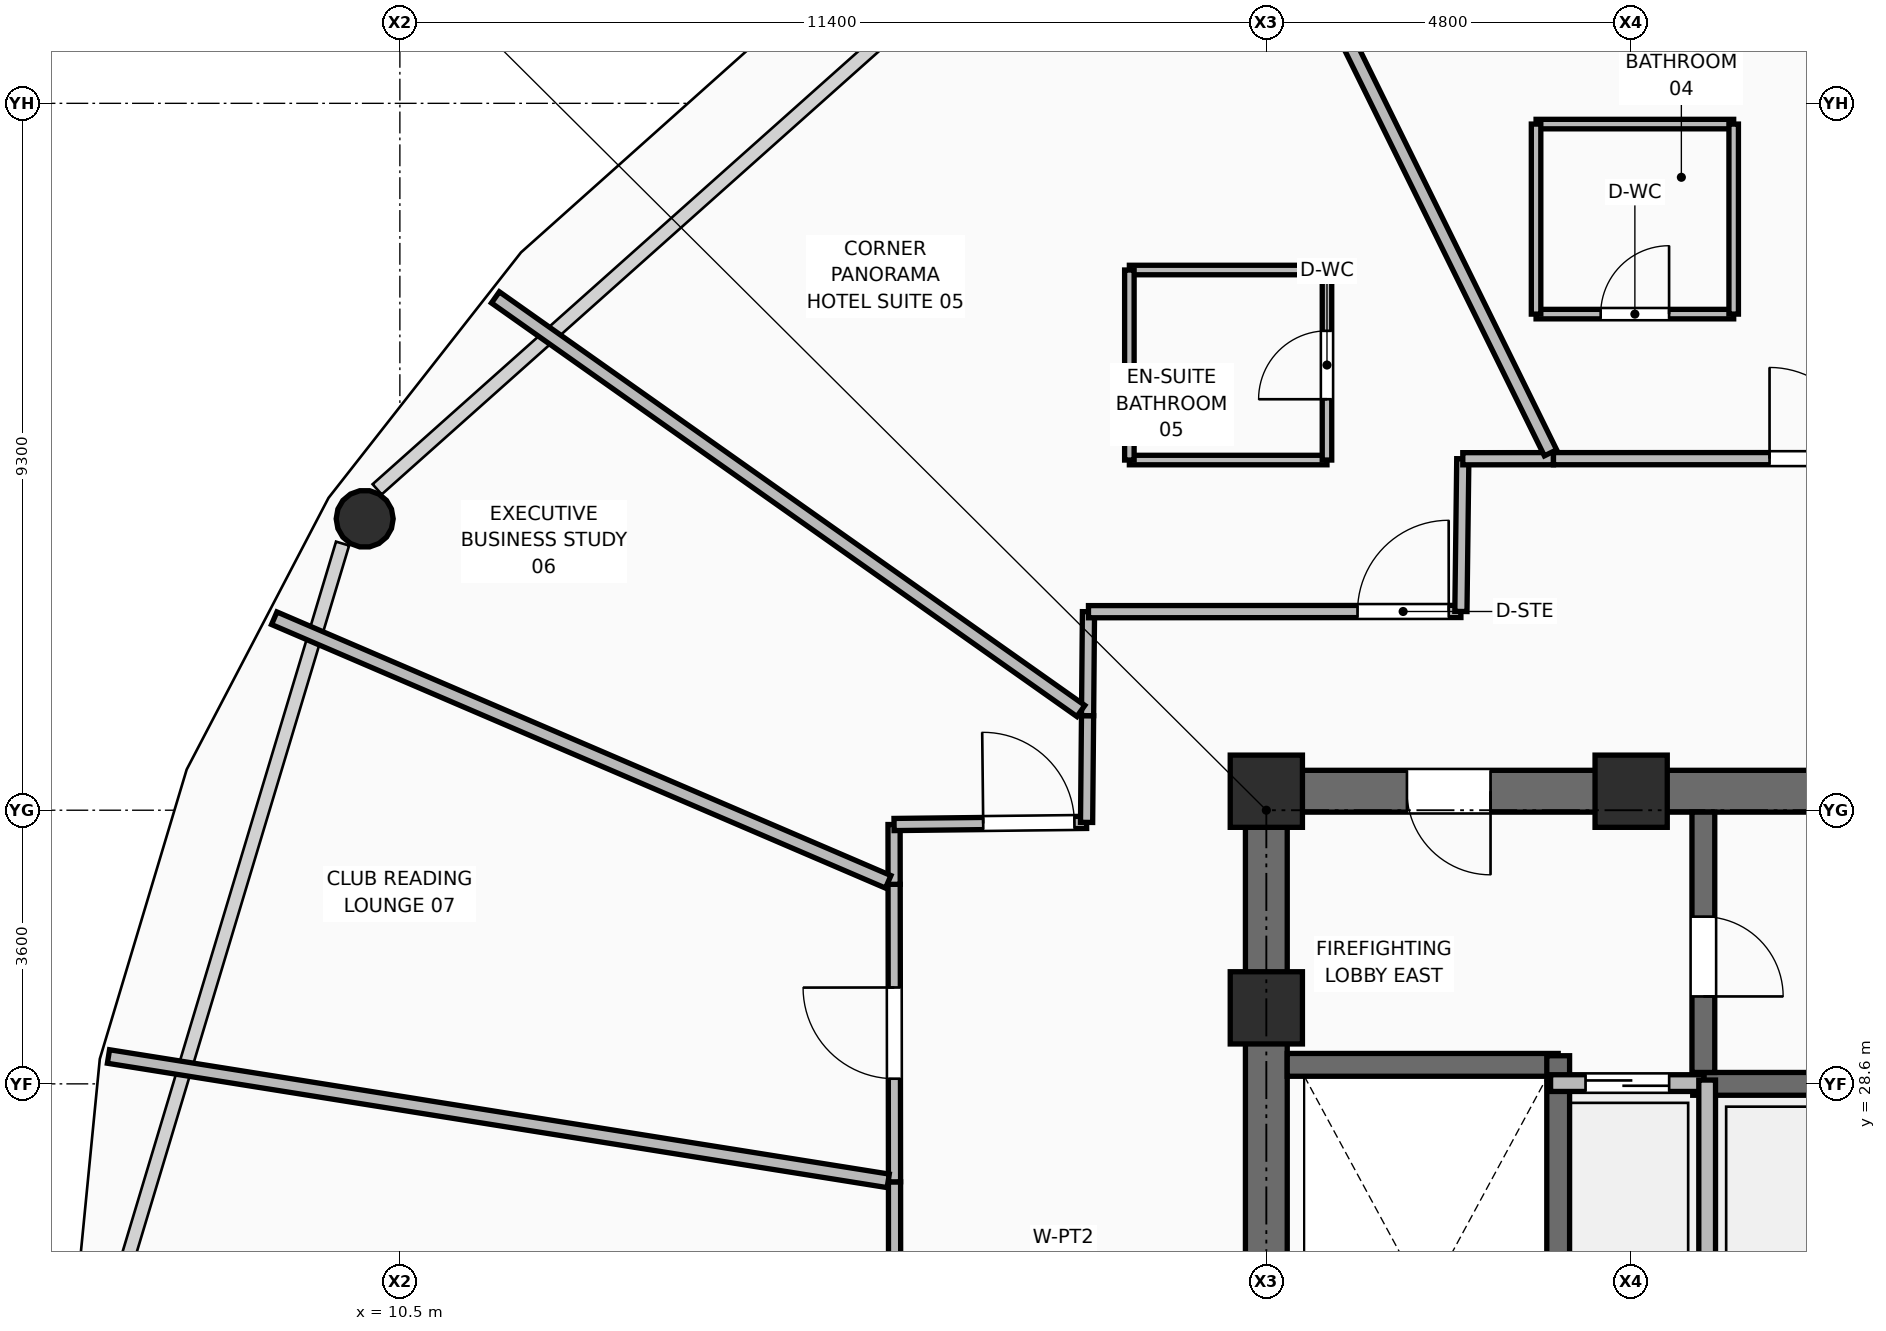
"""IFC4 building model, lengths in metres.
Left out: names, types, materials, properties, quantities, classifications, styles, units other than length and angle.
Written with IfcOpenShell. Run it as: python <this file> out.ifc"""

import sys

from ifc_helpers import new_model, si_unit, direction, frame, frame_2d, origin, origin_2d, place, context, subcontext, project, spatial, rectangle, hollow_circle, extrude, element, fill, save


model = new_model("IFC4")
c1 = context("Model", 3, precision=1e-05, world=origin(), true_north=direction((0.0, 1.0)))
c2 = subcontext(c1, "Body", "Model", "MODEL_VIEW")
j1 = project(units=[si_unit("LENGTHUNIT", "METRE"), si_unit("PLANEANGLEUNIT", "RADIAN")], contexts=[c1])
p1 = place(None, origin())
s1 = spatial("IfcSite", under=j1, at=p1, CompositionType="ELEMENT")
p2 = place(p1, origin())
s2 = spatial("IfcBuilding", under=s1, at=p2, CompositionType="ELEMENT")
p3 = place(p2, frame((0.0, 0.0, 149.7)))
s3 = spatial("IfcBuildingStorey", under=s2, at=p3, CompositionType="ELEMENT", Elevation=149.7)
for number, where, z_axis, x_axis in (
    (1, (21.9, 29.6, 0.0), (0.0, 0.0, 1.0), (1.0, 0.0, 0.0)),
    (2, (21.9, 32.45, 0.0), (0.0, 0.0, 1.0), (1.0, 0.0, 0.0)),
    (3, (26.7, 32.45, 0.0), (0.0, 0.0, 1.0), (1.0, 0.0, 0.0)),
):
    element("IfcColumn", number, at=place(p3, frame(where, z_axis=z_axis, x_axis=x_axis)), inside=s3, PredefinedType="COLUMN", context=c2, shape_type="SweptSolid", body=[
        extrude(rectangle(XDim=0.95, YDim=0.95, at=origin_2d()), origin(), (0.0, 0.0, 1.0), 3.75),
    ])
p4 = place(p3, frame((10.037, 36.034, 0.0), z_axis=(0.0, 0.0, 1.0), x_axis=(1.0, 0.0, 0.0)))
e4 = element("IfcColumn", 4, at=p4, inside=s3, PredefinedType="COLUMN", context=c2, shape_type="SweptSolid", body=[
    extrude(hollow_circle(Radius=0.375, WallThickness=0.035, at=origin_2d()), origin(), (0.0, 0.0, 1.0), 3.57),
])
p5 = place(p3, frame((21.625, 32.45, 0.0), z_axis=(0.0, 0.0, 1.0), x_axis=(1.0, 0.0, 0.0)))
e5 = element("IfcWall", 5, at=p5, inside=s3, PredefinedType="SHEAR", context=c2, shape_type="SweptSolid", body=[
    extrude(rectangle(XDim=19.75, YDim=0.55, at=frame_2d((9.875, 0.0))), origin(), (0.0, 0.0, 1.0), 3.57),
])
p6 = place(p5, frame((2.125, 0.0, 0.0)))
e6 = element("IfcOpeningElement", 6, at=p6, cuts=e5, PredefinedType="OPENING", context=c2, shape_type="SweptSolid", body=[
    extrude(rectangle(XDim=1.1, YDim=2.1, at=frame_2d((0.55, 1.05))), frame((0.0, 0.285, 0.0), z_axis=(0.0, -1.0, 0.0), x_axis=(1.0, 0.0, 0.0)), (0.0, 0.0, 1.0), 0.57),
])
p7 = place(p5, frame((15.515, 0.0, 0.0)))
e7 = element("IfcOpeningElement", 7, at=p7, cuts=e5, PredefinedType="OPENING", context=c2, shape_type="SweptSolid", body=[
    extrude(rectangle(XDim=1.0, YDim=2.1, at=frame_2d((0.5, 1.05))), frame((0.0, 0.285, 0.0), z_axis=(0.0, -1.0, 0.0), x_axis=(1.0, 0.0, 0.0)), (0.0, 0.0, 1.0), 0.57),
])
p8 = place(p5, frame((17.525, 0.0, 0.0)))
e8 = element("IfcOpeningElement", 8, at=p8, cuts=e5, PredefinedType="OPENING", context=c2, shape_type="SweptSolid", body=[
    extrude(rectangle(XDim=0.9, YDim=2.1, at=frame_2d((0.45, 1.05))), frame((0.0, 0.285, 0.0), z_axis=(0.0, -1.0, 0.0), x_axis=(1.0, 0.0, 0.0)), (0.0, 0.0, 1.0), 0.57),
])
p9 = place(p3, frame((21.9, 18.075, 0.0), z_axis=(0.0, 0.0, 1.0), x_axis=(0.0, 1.0, 0.0)))
e9 = element("IfcWall", 9, at=p9, inside=s3, PredefinedType="SHEAR", context=c2, shape_type="SweptSolid", body=[
    extrude(rectangle(XDim=14.1, YDim=0.55, at=frame_2d((7.05, 0.0))), origin(), (0.0, 0.0, 1.0), 3.57),
])
p10 = place(p3, frame((22.175, 28.85, 0.0), z_axis=(0.0, 0.0, 1.0), x_axis=(1.0, 0.0, 0.0)))
e10 = element("IfcWall", 10, at=p10, inside=s3, PredefinedType="SHEAR", context=c2, shape_type="SweptSolid", body=[
    extrude(rectangle(XDim=3.565, YDim=0.3, at=frame_2d((1.782, 0.0))), origin(), (0.0, 0.0, 1.0), 3.57),
])
p11 = place(p3, frame((25.74, 20.98, 0.0), z_axis=(0.0, 0.0, 1.0), x_axis=(0.0, 1.0, 0.0)))
e11 = element("IfcWall", 11, at=p11, inside=s3, PredefinedType="SHEAR", context=c2, shape_type="SweptSolid", body=[
    extrude(rectangle(XDim=7.99, YDim=0.3, at=frame_2d((3.995, 0.0))), origin(), (0.0, 0.0, 1.0), 3.57),
])
p12 = place(p3, frame((27.51, 28.6, 0.0), z_axis=(0.0, 0.0, 1.0), x_axis=(1.0, 0.0, 0.0)))
e12 = element("IfcWall", 12, at=p12, inside=s3, PredefinedType="SHEAR", context=c2, shape_type="SweptSolid", body=[
    extrude(rectangle(XDim=8.03, YDim=0.3, at=frame_2d((4.015, 0.0))), origin(), (0.0, 0.0, 1.0), 3.57),
])
p13 = place(p3, frame((27.65, 28.75, 0.0), z_axis=(0.0, 0.0, 1.0), x_axis=(0.0, 1.0, 0.0)))
e13 = element("IfcWall", 13, at=p13, inside=s3, PredefinedType="SHEAR", context=c2, shape_type="SweptSolid", body=[
    extrude(rectangle(XDim=3.425, YDim=0.3, at=frame_2d((1.712, 0.0))), origin(), (0.0, 0.0, 1.0), 3.57),
])
p14 = place(p13, frame((1.0, 0.0, 0.0)))
e14 = element("IfcOpeningElement", 14, at=p14, cuts=e13, PredefinedType="OPENING", context=c2, shape_type="SweptSolid", body=[
    extrude(rectangle(XDim=1.05, YDim=2.1, at=frame_2d((0.525, 1.05))), frame((0.0, 0.16, 0.0), z_axis=(0.0, -1.0, 0.0), x_axis=(1.0, 0.0, 0.0)), (0.0, 0.0, 1.0), 0.32),
])
p15 = place(p3, frame((25.64, 28.61, 0.0), z_axis=(0.0, 0.0, 1.0), x_axis=(1.0, 0.0, 0.0)))
e15 = element("IfcWall", 15, at=p15, inside=s3, PredefinedType="PARTITIONING", context=c2, shape_type="SweptSolid", body=[
    extrude(rectangle(XDim=2.02, YDim=0.22, at=frame_2d((1.01, 0.0))), origin(), (0.0, 0.0, 1.0), 3.55),
])
p16 = place(p15, frame((0.46, 0.0, 0.0)))
e16 = element("IfcOpeningElement", 16, at=p16, cuts=e15, PredefinedType="OPENING", context=c2, shape_type="SweptSolid", body=[
    extrude(rectangle(XDim=1.1, YDim=2.2, at=frame_2d((0.55, 1.1))), frame((0.0, 0.12, 0.0), z_axis=(0.0, -1.0, 0.0), x_axis=(1.0, 0.0, 0.0)), (0.0, 0.0, 1.0), 0.24),
])
p17 = place(p3, frame((27.7, 25.65, 0.0), z_axis=(0.0, 0.0, 1.0), x_axis=(0.0, 1.0, 0.0)))
e17 = element("IfcWall", 17, at=p17, inside=s3, PredefinedType="PARTITIONING", context=c2, shape_type="SweptSolid", body=[
    extrude(rectangle(XDim=3.0, YDim=0.22, at=frame_2d((1.5, 0.0))), origin(), (0.0, 0.0, 1.0), 3.55),
])
p18 = place(p3, frame((17.009, 26.125, 0.0), z_axis=(0.0, 0.0, 1.0), x_axis=(-0.00082338383, 0.999999661019, 0.0)))
e18 = element("IfcWall", 18, at=p18, inside=s3, PredefinedType="PARTITIONING", context=c2, shape_type="SweptSolid", body=[
    extrude(rectangle(XDim=1.186, YDim=0.16, at=frame_2d((0.593, 0.0))), origin(), (0.0, 0.0, 1.0), 3.55),
])
p19 = place(p3, frame((17.008, 27.311, 0.0), z_axis=(0.0, 0.0, 1.0), x_axis=(-0.001309879116, 0.999999142108, 0.0)))
e19 = element("IfcWall", 19, at=p19, inside=s3, PredefinedType="PARTITIONING", context=c2, shape_type="SweptSolid", body=[
    extrude(rectangle(XDim=3.914, YDim=0.16, at=frame_2d((1.957, 0.0))), origin(), (0.0, 0.0, 1.0), 3.55),
])
p20 = place(p19, frame((1.357, 0.0, 0.0)))
e20 = element("IfcOpeningElement", 20, at=p20, cuts=e19, PredefinedType="OPENING", context=c2, shape_type="SweptSolid", body=[
    extrude(rectangle(XDim=1.2, YDim=2.1, at=frame_2d((0.6, 1.05))), frame((0.0, 0.09, 0.0), z_axis=(0.0, -1.0, 0.0), x_axis=(1.0, 0.0, 0.0)), (0.0, 0.0, 1.0), 0.18),
])
p21 = place(p3, frame((17.003, 31.225, 0.0), z_axis=(0.0, 0.0, 1.0), x_axis=(-0.001241078784, 0.999999229861, 0.0)))
e21 = element("IfcWall", 21, at=p21, inside=s3, PredefinedType="PARTITIONING", context=c2, shape_type="SweptSolid", body=[
    extrude(rectangle(XDim=0.787, YDim=0.16, at=frame_2d((0.394, 0.0))), origin(), (0.0, 0.0, 1.0), 3.55),
])
p22 = place(p3, frame((17.002, 32.012, 0.0), z_axis=(0.0, 0.0, 1.0), x_axis=(0.999938574393, 0.011083656487, 0.0)))
e22 = element("IfcWall", 22, at=p22, inside=s3, PredefinedType="PARTITIONING", context=c2, shape_type="SweptSolid", body=[
    extrude(rectangle(XDim=2.533, YDim=0.16, at=frame_2d((1.267, 0.0))), origin(), (0.0, 0.0, 1.0), 3.55),
])
p23 = place(p22, frame((1.173, 0.0, 0.0)))
e23 = element("IfcOpeningElement", 23, at=p23, cuts=e22, PredefinedType="OPENING", context=c2, shape_type="SweptSolid", body=[
    extrude(rectangle(XDim=1.2, YDim=2.1, at=frame_2d((0.6, 1.05))), frame((0.0, 0.09, 0.0), z_axis=(0.0, -1.0, 0.0), x_axis=(1.0, 0.0, 0.0)), (0.0, 0.0, 1.0), 0.18),
])
p24 = place(p3, frame((19.535, 32.04, 0.0), z_axis=(0.0, 0.0, 1.0), x_axis=(0.009389257464, 0.999955919951, 0.0)))
e24 = element("IfcWall", 24, at=p24, inside=s3, PredefinedType="PARTITIONING", context=c2, shape_type="SweptSolid", body=[
    extrude(rectangle(XDim=1.404, YDim=0.16, at=frame_2d((0.702, 0.0))), origin(), (0.0, 0.0, 1.0), 3.006),
])
p25 = place(p3, frame((19.548, 33.444, 0.0), z_axis=(0.0, 0.0, 1.0), x_axis=(0.008744980606, 0.999961761926, 0.0)))
e25 = element("IfcWall", 25, at=p25, inside=s3, PredefinedType="PARTITIONING", context=c2, shape_type="SweptSolid", body=[
    extrude(rectangle(XDim=1.368, YDim=0.16, at=frame_2d((0.684, 0.0))), origin(), (0.0, 0.0, 1.0), 3.55),
])
p26 = place(p3, frame((19.56, 34.812, 0.0), z_axis=(0.0, 0.0, 1.0), x_axis=(0.999999821253, 0.000597907217, 0.0)))
e26 = element("IfcWall", 26, at=p26, inside=s3, PredefinedType="PARTITIONING", context=c2, shape_type="SweptSolid", body=[
    extrude(rectangle(XDim=4.9, YDim=0.16, at=frame_2d((2.45, 0.0))), origin(), (0.0, 0.0, 1.0), 3.006),
])
p27 = place(p26, frame((3.54, 0.0, 0.0)))
e27 = element("IfcOpeningElement", 27, at=p27, cuts=e26, PredefinedType="OPENING", context=c2, shape_type="SweptSolid", body=[
    extrude(rectangle(XDim=1.2, YDim=2.1, at=frame_2d((0.6, 1.05))), frame((0.0, 0.09, 0.0), z_axis=(0.0, -1.0, 0.0), x_axis=(1.0, 0.0, 0.0)), (0.0, 0.0, 1.0), 0.18),
])
p28 = place(p3, frame((24.46, 34.815, 0.0), z_axis=(0.0, 0.0, 1.0), x_axis=(0.01251572883, 0.999921675199, 0.0)))
e28 = element("IfcWall", 28, at=p28, inside=s3, PredefinedType="PARTITIONING", context=c2, shape_type="SweptSolid", body=[
    extrude(rectangle(XDim=2.009, YDim=0.16, at=frame_2d((1.005, 0.0))), origin(), (0.0, 0.0, 1.0), 3.55),
])
p29 = place(p3, frame((24.485, 36.824, 0.0), z_axis=(0.0, 0.0, 1.0), x_axis=(0.999999664894, 0.000818665301, 0.0)))
e29 = element("IfcWall", 29, at=p29, inside=s3, PredefinedType="PARTITIONING", context=c2, shape_type="SweptSolid", body=[
    extrude(rectangle(XDim=1.193, YDim=0.16, at=frame_2d((0.596, 0.0))), origin(), (0.0, 0.0, 1.0), 3.55),
])
p30 = place(p3, frame((25.678, 36.825, 0.0), z_axis=(0.0, 0.0, 1.0), x_axis=(0.999999989491, 0.000144974809, 0.0)))
e30 = element("IfcWall", 30, at=p30, inside=s3, PredefinedType="PARTITIONING", context=c2, shape_type="SweptSolid", body=[
    extrude(rectangle(XDim=6.736, YDim=0.16, at=frame_2d((3.368, 0.0))), origin(), (0.0, 0.0, 1.0), 3.006),
])
p31 = place(p30, frame((2.843, 0.0, 0.0)))
e31 = element("IfcOpeningElement", 31, at=p31, cuts=e30, PredefinedType="OPENING", context=c2, shape_type="SweptSolid", body=[
    extrude(rectangle(XDim=1.2, YDim=2.1, at=frame_2d((0.6, 1.05))), frame((0.0, 0.09, 0.0), z_axis=(0.0, -1.0, 0.0), x_axis=(1.0, 0.0, 0.0)), (0.0, 0.0, 1.0), 0.18),
])
p32 = place(p3, frame((25.639, 36.902, 0.0), z_axis=(0.0, 0.0, 1.0), x_axis=(-0.44167900267, 0.897173148617, 0.0)))
e32 = element("IfcWall", 32, at=p32, inside=s3, PredefinedType="PARTITIONING", context=c2, shape_type="SweptSolid", body=[
    extrude(rectangle(XDim=9.631, YDim=0.18, at=frame_2d((4.815, 0.0))), origin(), (0.0, 0.0, 1.0), 2.852),
])
p33 = place(p3, frame((19.46, 33.506, 0.0), z_axis=(0.0, 0.0, 1.0), x_axis=(-0.816788462003, 0.576937265513, 0.0)))
e33 = element("IfcWall", 33, at=p33, inside=s3, PredefinedType="PARTITIONING", context=c2, shape_type="SweptSolid", body=[
    extrude(rectangle(XDim=9.431, YDim=0.18, at=frame_2d((4.715, 0.0))), origin(), (0.0, 0.0, 1.0), 2.852),
])
p34 = place(p3, frame((16.925, 31.258, 0.0), z_axis=(0.0, 0.0, 1.0), x_axis=(-0.918899218309, 0.394492365694, 0.0)))
e34 = element("IfcWall", 34, at=p34, inside=s3, PredefinedType="PARTITIONING", context=c2, shape_type="SweptSolid", body=[
    extrude(rectangle(XDim=8.791, YDim=0.18, at=frame_2d((4.396, 0.0))), origin(), (0.0, 0.0, 1.0), 2.852),
])
p35 = place(p3, frame((16.925, 27.324, 0.0), z_axis=(0.0, 0.0, 1.0), x_axis=(-0.987522476436, 0.157478120811, 0.0)))
e35 = element("IfcWall", 35, at=p35, inside=s3, PredefinedType="PARTITIONING", context=c2, shape_type="SweptSolid", body=[
    extrude(rectangle(XDim=10.389, YDim=0.18, at=frame_2d((5.194, 0.0))), origin(), (0.0, 0.0, 1.0), 2.852),
])
p36 = place(p3, frame((25.449, 38.727, 0.0), z_axis=(0.0, 0.0, 1.0), x_axis=(1.0, 0.0, 0.0)))
e36 = element("IfcWall", 36, at=p36, inside=s3, PredefinedType="PARTITIONING", context=c2, shape_type="SweptSolid", body=[
    extrude(rectangle(XDim=2.6, YDim=0.125, at=frame_2d((1.3, 0.0))), origin(), (0.0, 0.0, 1.0), 3.55),
])
p37 = place(p36, frame((0.85, 0.0, 0.0)))
e37 = element("IfcOpeningElement", 37, at=p37, cuts=e36, PredefinedType="OPENING", context=c2, shape_type="SweptSolid", body=[
    extrude(rectangle(XDim=0.9, YDim=2.1, at=frame_2d((0.45, 1.05))), frame((0.0, 0.073, 0.0), z_axis=(0.0, -1.0, 0.0), x_axis=(1.0, 0.0, 0.0)), (0.0, 0.0, 1.0), 0.145),
])
p38 = place(p3, frame((25.449, 41.227, 0.0), z_axis=(0.0, 0.0, 1.0), x_axis=(1.0, 0.0, 0.0)))
e38 = element("IfcWall", 38, at=p38, inside=s3, PredefinedType="PARTITIONING", context=c2, shape_type="SweptSolid", body=[
    extrude(rectangle(XDim=2.6, YDim=0.125, at=frame_2d((1.3, 0.0))), origin(), (0.0, 0.0, 1.0), 3.55),
])
for number, where, z_axis, x_axis in (
    (39, (25.449, 38.727, 0.0), (0.0, 0.0, 1.0), (0.0, 1.0, 0.0)),
    (40, (28.049, 38.727, 0.0), (0.0, 0.0, 1.0), (0.0, 1.0, 0.0)),
):
    element("IfcWall", number, at=place(p3, frame(where, z_axis=z_axis, x_axis=x_axis)), inside=s3, PredefinedType="PARTITIONING", context=c2, shape_type="SweptSolid", body=[
        extrude(rectangle(XDim=2.5, YDim=0.125, at=frame_2d((1.25, 0.0))), origin(), (0.0, 0.0, 1.0), 3.55),
    ])
for number, where, z_axis, x_axis in (
    (41, (20.098, 36.807, 0.0), (0.0, 0.0, 1.0), (1.0, 0.0, 0.0)),
    (42, (20.098, 39.307, 0.0), (0.0, 0.0, 1.0), (1.0, 0.0, 0.0)),
):
    element("IfcWall", number, at=place(p3, frame(where, z_axis=z_axis, x_axis=x_axis)), inside=s3, PredefinedType="PARTITIONING", context=c2, shape_type="SweptSolid", body=[
        extrude(rectangle(XDim=2.6, YDim=0.125, at=frame_2d((1.3, 0.0))), origin(), (0.0, 0.0, 1.0), 3.006),
    ])
p39 = place(p3, frame((20.098, 36.807, 0.0), z_axis=(0.0, 0.0, 1.0), x_axis=(0.0, 1.0, 0.0)))
e43 = element("IfcWall", 43, at=p39, inside=s3, PredefinedType="PARTITIONING", context=c2, shape_type="SweptSolid", body=[
    extrude(rectangle(XDim=2.5, YDim=0.125, at=frame_2d((1.25, 0.0))), origin(), (0.0, 0.0, 1.0), 3.006),
])
p40 = place(p3, frame((22.698, 36.807, 0.0), z_axis=(0.0, 0.0, 1.0), x_axis=(0.0, 1.0, 0.0)))
e44 = element("IfcWall", 44, at=p40, inside=s3, PredefinedType="PARTITIONING", context=c2, shape_type="SweptSolid", body=[
    extrude(rectangle(XDim=2.5, YDim=0.125, at=frame_2d((1.25, 0.0))), origin(), (0.0, 0.0, 1.0), 3.55),
])
p41 = place(p40, frame((0.8, 0.0, 0.0)))
e45 = element("IfcOpeningElement", 45, at=p41, cuts=e44, PredefinedType="OPENING", context=c2, shape_type="SweptSolid", body=[
    extrude(rectangle(XDim=0.9, YDim=2.1, at=frame_2d((0.45, 1.05))), frame((0.0, 0.073, 0.0), z_axis=(0.0, -1.0, 0.0), x_axis=(1.0, 0.0, 0.0)), (0.0, 0.0, 1.0), 0.145),
])
p42 = place(p14, frame((1.05, 0.0, 0.0), z_axis=(0.0, 0.0, 1.0), x_axis=(-1.0, 0.0, 0.0)))
e46 = element("IfcDoor", 46, at=p42, inside=s3, OperationType="SINGLE_SWING_RIGHT", PredefinedType="DOOR", context=c2, shape_type="SweptSolid", body=[
    extrude(rectangle(XDim=1.05, YDim=2.1, at=frame_2d((0.525, 1.05))), frame((0.0, 0.025, 0.0), z_axis=(0.0, -1.0, 0.0), x_axis=(1.0, 0.0, 0.0)), (0.0, 0.0, 1.0), 0.05),
])
fill(e14, e46)
p43 = place(p16, origin())
e47 = element("IfcDoor", 47, at=p43, inside=s3, OperationType="DOUBLE_DOOR_SLIDING", PredefinedType="DOOR", context=c2, shape_type="SweptSolid", body=[
    extrude(rectangle(XDim=1.1, YDim=2.2, at=frame_2d((0.55, 1.1))), frame((0.0, 0.025, 0.0), z_axis=(0.0, -1.0, 0.0), x_axis=(1.0, 0.0, 0.0)), (0.0, 0.0, 1.0), 0.05),
])
fill(e16, e47)
p44 = place(p6, frame((1.1, 0.0, 0.0), z_axis=(0.0, 0.0, 1.0), x_axis=(-1.0, 0.0, 0.0)))
e48 = element("IfcDoor", 48, at=p44, inside=s3, OperationType="SINGLE_SWING_LEFT", PredefinedType="DOOR", context=c2, shape_type="SweptSolid", body=[
    extrude(rectangle(XDim=1.1, YDim=2.1, at=frame_2d((0.55, 1.05))), frame((0.0, 0.025, 0.0), z_axis=(0.0, -1.0, 0.0), x_axis=(1.0, 0.0, 0.0)), (0.0, 0.0, 1.0), 0.05),
])
fill(e6, e48)
p45 = place(p37, origin())
e49 = element("IfcDoor", 49, at=p45, inside=s3, OperationType="SINGLE_SWING_RIGHT", PredefinedType="DOOR", context=c2, shape_type="SweptSolid", body=[
    extrude(rectangle(XDim=0.9, YDim=2.1, at=frame_2d((0.45, 1.05))), frame((0.0, 0.025, 0.0), z_axis=(0.0, -1.0, 0.0), x_axis=(1.0, 0.0, 0.0)), (0.0, 0.0, 1.0), 0.05),
])
fill(e37, e49)
p46 = place(p31, origin())
e50 = element("IfcDoor", 50, at=p46, inside=s3, OperationType="SINGLE_SWING_LEFT", PredefinedType="DOOR", context=c2, shape_type="SweptSolid", body=[
    extrude(rectangle(XDim=1.2, YDim=2.1, at=frame_2d((0.6, 1.05))), frame((0.0, 0.025, 0.0), z_axis=(0.0, -1.0, 0.0), x_axis=(1.0, 0.0, 0.0)), (0.0, 0.0, 1.0), 0.05),
])
fill(e31, e50)
p47 = place(p41, origin())
e51 = element("IfcDoor", 51, at=p47, inside=s3, OperationType="SINGLE_SWING_LEFT", PredefinedType="DOOR", context=c2, shape_type="SweptSolid", body=[
    extrude(rectangle(XDim=0.9, YDim=2.1, at=frame_2d((0.45, 1.05))), frame((0.0, 0.025, 0.0), z_axis=(0.0, -1.0, 0.0), x_axis=(1.0, 0.0, 0.0)), (0.0, 0.0, 1.0), 0.05),
])
fill(e45, e51)
p48 = place(p27, origin())
e52 = element("IfcDoor", 52, at=p48, inside=s3, OperationType="SINGLE_SWING_RIGHT", PredefinedType="DOOR", context=c2, shape_type="SweptSolid", body=[
    extrude(rectangle(XDim=1.2, YDim=2.1, at=frame_2d((0.6, 1.05))), frame((0.0, 0.025, 0.0), z_axis=(0.0, -1.0, 0.0), x_axis=(1.0, 0.0, 0.0)), (0.0, 0.0, 1.0), 0.05),
])
fill(e27, e52)
p49 = place(p23, origin())
e53 = element("IfcDoor", 53, at=p49, inside=s3, OperationType="SINGLE_SWING_LEFT", PredefinedType="DOOR", context=c2, shape_type="SweptSolid", body=[
    extrude(rectangle(XDim=1.2, YDim=2.1, at=frame_2d((0.6, 1.05))), frame((0.0, 0.025, 0.0), z_axis=(0.0, -1.0, 0.0), x_axis=(1.0, 0.0, 0.0)), (0.0, 0.0, 1.0), 0.05),
])
fill(e23, e53)
p50 = place(p20, origin())
e54 = element("IfcDoor", 54, at=p50, inside=s3, OperationType="SINGLE_SWING_RIGHT", PredefinedType="DOOR", context=c2, shape_type="SweptSolid", body=[
    extrude(rectangle(XDim=1.2, YDim=2.1, at=frame_2d((0.6, 1.05))), frame((0.0, 0.025, 0.0), z_axis=(0.0, -1.0, 0.0), x_axis=(1.0, 0.0, 0.0)), (0.0, 0.0, 1.0), 0.05),
])
fill(e20, e54)
save(model, sys.argv[1])
